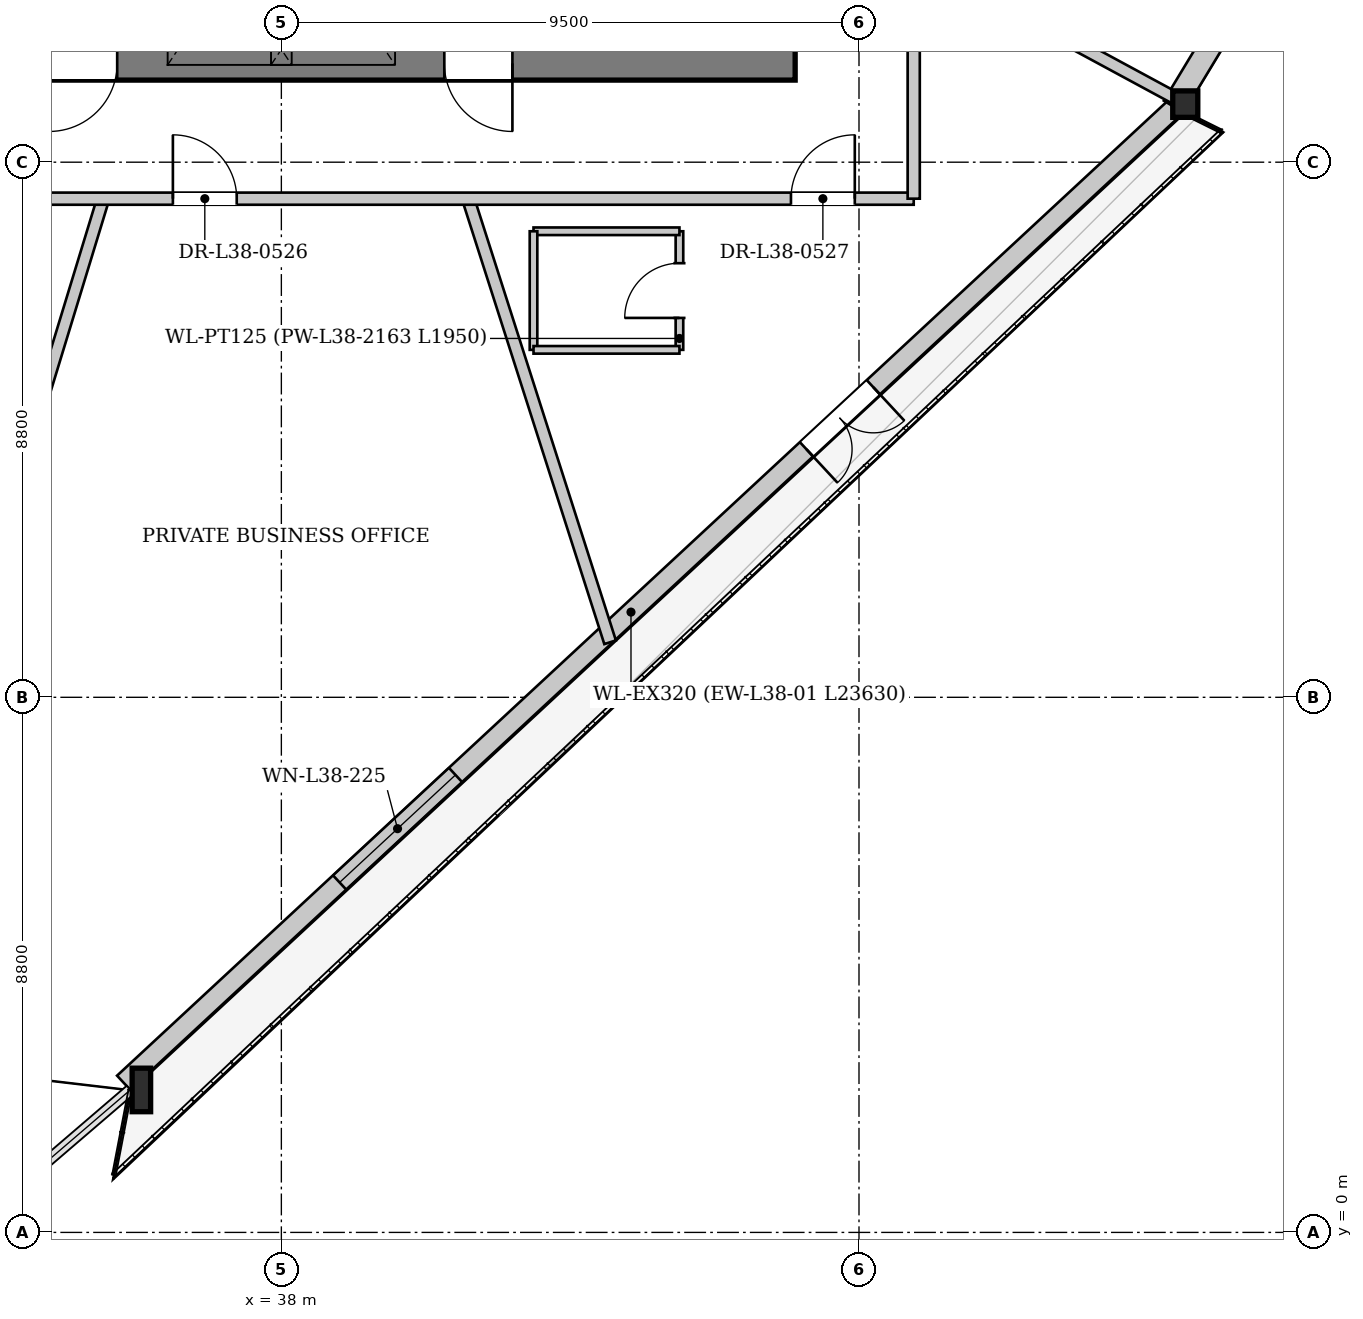
"""IFC4 building model, lengths in metres.
Left out: names, types, materials, properties, quantities, classifications, styles, units other than length and angle.
Written with IfcOpenShell. Run it as: python <this file> out.ifc"""

import sys

from ifc_helpers import new_model, si_unit, direction, frame, frame_2d, origin, origin_2d, place, context, subcontext, project, spatial, rectangle, i_section, extrude, source, transform, mapped, element, fill, save


model = new_model("IFC4")
c1 = context("Model", 3, precision=1e-05, world=origin(), true_north=direction((0.0, 1.0)))
c2 = subcontext(c1, "Body", "Model", "MODEL_VIEW")
j1 = project(units=[si_unit("LENGTHUNIT", "METRE"), si_unit("PLANEANGLEUNIT", "RADIAN")], contexts=[c1])
p1 = place(None, origin())
s1 = spatial("IfcSite", under=j1, at=p1, CompositionType="ELEMENT")
p2 = place(p1, origin())
s2 = spatial("IfcBuilding", under=s1, at=p2, CompositionType="ELEMENT")
p3 = place(p2, frame((0.0, 0.0, 146.6)))
s3 = spatial("IfcBuildingStorey", under=s2, at=p3, CompositionType="ELEMENT", Elevation=146.6)
m1 = source(origin(), c2, "Body", "SweptSolid", [
    extrude(i_section(OverallWidth=0.304, OverallDepth=0.716, WebThickness=0.021, FlangeThickness=0.04, at=origin_2d()), origin(), (0.0, 0.0, 1.0), 3.405),
])
p4 = place(p3, frame((35.516, 2.344, 0.0), z_axis=(0.107062289558, -0.000286838016, 0.994252273761), x_axis=(0.002679159842, 0.999996411045, 0.0)))
e1 = element("IfcColumn", 1, at=p4, inside=s3, PredefinedType="COLUMN", context=c2, shape_type="MappedRepresentation", body=[
    mapped(m1, transform((0.0, 0.0, 0.0), x_axis=(1.0, 0.0, 0.0), y_axis=(0.0, 1.0, 0.0), z_axis=(0.0, 0.0, 1.0), scale=1.0)),
])
m2 = source(origin(), c2, "Body", "SweptSolid", [
    extrude(i_section(OverallWidth=0.412, OverallDepth=0.435, WebThickness=0.031, FlangeThickness=0.05, at=origin_2d()), origin(), (0.0, 0.0, 1.0), 3.397),
])
p5 = place(p3, frame((52.839, 18.415, 0.0), z_axis=(0.016098414869, 0.082648112052, 0.996448759652), x_axis=(-0.981553147676, 0.191189482678, 0.0)))
e2 = element("IfcColumn", 2, at=p5, inside=s3, PredefinedType="COLUMN", context=c2, shape_type="MappedRepresentation", body=[
    mapped(m2, transform((0.0, 0.0, 0.0), x_axis=(1.0, 0.0, 0.0), y_axis=(0.0, 1.0, 0.0), z_axis=(0.0, 0.0, 1.0), scale=1.0)),
])
p6 = place(p3, frame((52.73, 18.532, 0.0), z_axis=(0.0, 0.0, 1.0), x_axis=(-0.73309626957, -0.680124885255, 0.0)))
e3 = element("IfcWall", 3, at=p6, inside=s3, PredefinedType="SOLIDWALL", context=c2, shape_type="SweptSolid", body=[
    extrude(rectangle(XDim=23.63, YDim=0.32, at=frame_2d((11.815, 0.0))), origin(), (0.0, 0.0, 1.0), 2.692),
])
p7 = place(p6, frame((6.812, 0.0, 0.0)))
e4 = element("IfcOpeningElement", 4, at=p7, cuts=e3, PredefinedType="OPENING", context=c2, shape_type="SweptSolid", body=[
    extrude(rectangle(XDim=1.5, YDim=2.3, at=frame_2d((0.75, 1.15))), frame((0.0, 0.17, 0.0), z_axis=(0.0, -1.0, 0.0), x_axis=(1.0, 0.0, 0.0)), (0.0, 0.0, 1.0), 0.34),
])
p8 = place(p6, frame((16.186, 0.0, 0.25)))
e5 = element("IfcOpeningElement", 5, at=p8, cuts=e3, PredefinedType="OPENING", context=c2, shape_type="SweptSolid", body=[
    extrude(rectangle(XDim=2.6, YDim=2.35, at=frame_2d((1.3, 1.175))), frame((0.0, 0.17, 0.0), z_axis=(0.0, -1.0, 0.0), x_axis=(1.0, 0.0, 0.0)), (0.0, 0.0, 1.0), 0.34),
])
p9 = place(p3, frame((64.901, 38.735, 0.0), z_axis=(0.0, 0.0, 1.0), x_axis=(-0.517346318523, -0.855776131188, 0.0)))
e6 = element("IfcWall", 6, at=p9, inside=s3, PredefinedType="SOLIDWALL", context=c2, shape_type="SweptSolid", body=[
    extrude(rectangle(XDim=23.63, YDim=0.38, at=frame_2d((11.815, 0.0))), origin(), (0.0, 0.0, 1.0), 2.692),
])
p10 = place(p9, frame((4.416, 0.0, 0.322)))
e7 = element("IfcOpeningElement", 7, at=p10, cuts=e6, PredefinedType="OPENING", context=c2, shape_type="SweptSolid", body=[
    extrude(rectangle(XDim=2.2, YDim=2.25, at=frame_2d((1.1, 1.125))), frame((0.0, 0.2, 0.0), z_axis=(0.0, -1.0, 0.0), x_axis=(1.0, 0.0, 0.0)), (0.0, 0.0, 1.0), 0.4),
])
p11 = place(p9, frame((15.914, 0.0, 0.322)))
e8 = element("IfcOpeningElement", 8, at=p11, cuts=e6, PredefinedType="OPENING", context=c2, shape_type="SweptSolid", body=[
    extrude(rectangle(XDim=2.2, YDim=2.25, at=frame_2d((1.1, 1.125))), frame((0.0, 0.2, 0.0), z_axis=(0.0, -1.0, 0.0), x_axis=(1.0, 0.0, 0.0)), (0.0, 0.0, 1.0), 0.4),
])
p12 = place(p3, frame((46.45, 19.225, 0.0), z_axis=(0.0, 0.0, 1.0), x_axis=(-1.0, 0.0, 0.0)))
e9 = element("IfcWall", 9, at=p12, inside=s3, PredefinedType="SHEAR", context=c2, shape_type="SweptSolid", body=[
    extrude(rectangle(XDim=16.9, YDim=0.55, at=frame_2d((8.45, 0.0))), origin(), (0.0, 0.0, 1.0), 3.3),
])
p13 = place(p12, frame((4.65, 0.0, 0.0)))
e10 = element("IfcOpeningElement", 10, at=p13, cuts=e9, PredefinedType="OPENING", context=c2, shape_type="SweptSolid", body=[
    extrude(rectangle(XDim=1.12, YDim=2.25, at=frame_2d((0.56, 1.125))), frame((0.0, 0.285, 0.0), z_axis=(0.0, -1.0, 0.0), x_axis=(1.0, 0.0, 0.0)), (0.0, 0.0, 1.0), 0.57),
])
p14 = place(p12, frame((11.15, 0.0, 0.0)))
e11 = element("IfcOpeningElement", 11, at=p14, cuts=e9, PredefinedType="OPENING", context=c2, shape_type="SweptSolid", body=[
    extrude(rectangle(XDim=1.12, YDim=2.25, at=frame_2d((0.56, 1.125))), frame((0.0, 0.285, 0.0), z_axis=(0.0, -1.0, 0.0), x_axis=(1.0, 0.0, 0.0)), (0.0, 0.0, 1.0), 0.57),
])
p15 = place(p3, frame((35.07, 17.0, 0.0), z_axis=(0.0, 0.0, 1.0), x_axis=(-0.29195683842, -0.956431494933, 0.0)))
e12 = element("IfcWall", 12, at=p15, inside=s3, PredefinedType="PARTITIONING", context=c2, shape_type="SweptSolid", body=[
    extrude(rectangle(XDim=14.719, YDim=0.2, at=frame_2d((7.36, 0.0))), origin(), (0.0, 0.0, 1.0), 2.895),
])
p16 = place(p3, frame((41.072, 17.0, 0.0), z_axis=(0.0, 0.0, 1.0), x_axis=(0.304787292701, -0.952420446131, 0.0)))
e13 = element("IfcWall", 13, at=p16, inside=s3, PredefinedType="PARTITIONING", context=c2, shape_type="SweptSolid", body=[
    extrude(rectangle(XDim=7.659, YDim=0.2, at=frame_2d((3.83, 0.0))), origin(), (0.0, 0.0, 1.0), 3.3),
])
p17 = place(p3, frame((48.4, 20.978, 0.0), z_axis=(0.0, 0.0, 1.0), x_axis=(0.879687571987, -0.475552074638, 0.0)))
e14 = element("IfcWall", 14, at=p17, inside=s3, PredefinedType="PARTITIONING", context=c2, shape_type="SweptSolid", body=[
    extrude(rectangle(XDim=5.101, YDim=0.2, at=frame_2d((2.55, 0.0))), origin(), (0.0, 0.0, 1.0), 2.835),
])
p18 = place(p3, frame((44.547, 14.514, 0.0), z_axis=(0.0, 0.0, 1.0), x_axis=(0.0, 1.0, 0.0)))
e15 = element("IfcWall", 15, at=p18, inside=s3, PredefinedType="PARTITIONING", context=c2, shape_type="SweptSolid", body=[
    extrude(rectangle(XDim=1.95, YDim=0.125, at=frame_2d((0.975, 0.0))), origin(), (0.0, 0.0, 1.0), 3.3),
])
p19 = place(p18, frame((0.525, 0.0, 0.0)))
e16 = element("IfcOpeningElement", 16, at=p19, cuts=e15, PredefinedType="OPENING", context=c2, shape_type="SweptSolid", body=[
    extrude(rectangle(XDim=0.9, YDim=2.1, at=frame_2d((0.45, 1.05))), frame((0.0, 0.073, 0.0), z_axis=(0.0, -1.0, 0.0), x_axis=(1.0, 0.0, 0.0)), (0.0, 0.0, 1.0), 0.145),
])
p20 = place(p3, frame((44.547, 16.464, 0.0), z_axis=(0.0, 0.0, 1.0), x_axis=(-1.0, 0.0, 0.0)))
e17 = element("IfcWall", 17, at=p20, inside=s3, PredefinedType="PARTITIONING", context=c2, shape_type="SweptSolid", body=[
    extrude(rectangle(XDim=2.4, YDim=0.125, at=frame_2d((1.2, 0.0))), origin(), (0.0, 0.0, 1.0), 3.3),
])
p21 = place(p3, frame((42.147, 16.464, 0.0), z_axis=(0.0, 0.0, 1.0), x_axis=(0.0, -1.0, 0.0)))
e18 = element("IfcWall", 18, at=p21, inside=s3, PredefinedType="PARTITIONING", context=c2, shape_type="SweptSolid", body=[
    extrude(rectangle(XDim=1.95, YDim=0.125, at=frame_2d((0.975, 0.0))), origin(), (0.0, 0.0, 1.0), 3.3),
])
p22 = place(p3, frame((42.147, 14.514, 0.0), z_axis=(0.0, 0.0, 1.0), x_axis=(1.0, 0.0, 0.0)))
e19 = element("IfcWall", 19, at=p22, inside=s3, PredefinedType="PARTITIONING", context=c2, shape_type="SweptSolid", body=[
    extrude(rectangle(XDim=2.4, YDim=0.125, at=frame_2d((1.2, 0.0))), origin(), (0.0, 0.0, 1.0), 3.3),
])
p23 = place(p3, frame((27.6, 17.0, 0.0), z_axis=(0.0, 0.0, 1.0), x_axis=(1.0, 0.0, 0.0)))
e20 = element("IfcWall", 20, at=p23, inside=s3, PredefinedType="PARTITIONING", context=c2, shape_type="SweptSolid", body=[
    extrude(rectangle(XDim=20.8, YDim=0.2, at=frame_2d((10.4, 0.0))), origin(), (0.0, 0.0, 1.0), 3.3),
])
p24 = place(p23, frame((1.56, 0.0, 0.0)))
e21 = element("IfcOpeningElement", 21, at=p24, cuts=e20, PredefinedType="OPENING", context=c2, shape_type="SweptSolid", body=[
    extrude(rectangle(XDim=1.05, YDim=2.2, at=frame_2d((0.525, 1.1))), frame((0.0, 0.11, 0.0), z_axis=(0.0, -1.0, 0.0), x_axis=(1.0, 0.0, 0.0)), (0.0, 0.0, 1.0), 0.22),
])
p25 = place(p23, frame((8.616, 0.0, 0.0)))
e22 = element("IfcOpeningElement", 22, at=p25, cuts=e20, PredefinedType="OPENING", context=c2, shape_type="SweptSolid", body=[
    extrude(rectangle(XDim=1.05, YDim=2.2, at=frame_2d((0.525, 1.1))), frame((0.0, 0.11, 0.0), z_axis=(0.0, -1.0, 0.0), x_axis=(1.0, 0.0, 0.0)), (0.0, 0.0, 1.0), 0.22),
])
p26 = place(p23, frame((18.781, 0.0, 0.0)))
e23 = element("IfcOpeningElement", 23, at=p26, cuts=e20, PredefinedType="OPENING", context=c2, shape_type="SweptSolid", body=[
    extrude(rectangle(XDim=1.05, YDim=2.2, at=frame_2d((0.525, 1.1))), frame((0.0, 0.11, 0.0), z_axis=(0.0, -1.0, 0.0), x_axis=(1.0, 0.0, 0.0)), (0.0, 0.0, 1.0), 0.22),
])
p27 = place(p3, frame((48.4, 17.0, 0.0), z_axis=(0.0, 0.0, 1.0), x_axis=(0.0, 1.0, 0.0)))
e24 = element("IfcWall", 24, at=p27, inside=s3, PredefinedType="PARTITIONING", context=c2, shape_type="SweptSolid", body=[
    extrude(rectangle(XDim=19.2, YDim=0.2, at=frame_2d((9.6, 0.0))), origin(), (0.0, 0.0, 1.0), 3.3),
])
p28 = place(p27, frame((6.726, 0.0, 0.0)))
e25 = element("IfcOpeningElement", 25, at=p28, cuts=e24, PredefinedType="OPENING", context=c2, shape_type="SweptSolid", body=[
    extrude(rectangle(XDim=1.05, YDim=2.2, at=frame_2d((0.525, 1.1))), frame((0.0, 0.11, 0.0), z_axis=(0.0, -1.0, 0.0), x_axis=(1.0, 0.0, 0.0)), (0.0, 0.0, 1.0), 0.22),
])
p29 = place(p27, frame((17.4, 0.0, 0.0)))
e26 = element("IfcOpeningElement", 26, at=p29, cuts=e24, PredefinedType="OPENING", context=c2, shape_type="SweptSolid", body=[
    extrude(rectangle(XDim=1.05, YDim=2.2, at=frame_2d((0.525, 1.1))), frame((0.0, 0.11, 0.0), z_axis=(0.0, -1.0, 0.0), x_axis=(1.0, 0.0, 0.0)), (0.0, 0.0, 1.0), 0.22),
])
m3 = source(origin(), c2, "Body", "SweptSolid", [
    extrude(rectangle(XDim=1.5, YDim=2.3, at=frame_2d((0.75, 1.15))), frame((0.0, 0.025, 0.0), z_axis=(0.0, -1.0, 0.0), x_axis=(1.0, 0.0, 0.0)), (0.0, 0.0, 1.0), 0.05),
])
p30 = place(p7, origin())
e27 = element("IfcDoor", 27, at=p30, inside=s3, OperationType="DOUBLE_DOOR_SINGLE_SWING", PredefinedType="DOOR", context=c2, shape_type="MappedRepresentation", body=[
    mapped(m3, transform((0.0, 0.0, 0.0), x_axis=(1.0, 0.0, 0.0), y_axis=(0.0, 1.0, 0.0), z_axis=(0.0, 0.0, 1.0), scale=1.0)),
])
fill(e4, e27)
m4 = source(origin(), c2, "Body", "SweptSolid", [
    extrude(rectangle(XDim=2.6, YDim=2.35, at=frame_2d((1.3, 1.175))), frame((0.0, 0.03, 0.0), z_axis=(0.0, -1.0, 0.0), x_axis=(1.0, 0.0, 0.0)), (0.0, 0.0, 1.0), 0.06),
])
p31 = place(p8, origin())
e28 = element("IfcWindow", 28, at=p31, inside=s3, PartitioningType="SINGLE_PANEL", PredefinedType="WINDOW", context=c2, shape_type="MappedRepresentation", body=[
    mapped(m4, transform((0.0, 0.0, 0.0), x_axis=(1.0, 0.0, 0.0), y_axis=(0.0, 1.0, 0.0), z_axis=(0.0, 0.0, 1.0), scale=1.0)),
])
fill(e5, e28)
m5 = source(origin(), c2, "Body", "SweptSolid", [
    extrude(rectangle(XDim=1.12, YDim=2.25, at=frame_2d((0.56, 1.125))), frame((0.0, 0.025, 0.0), z_axis=(0.0, -1.0, 0.0), x_axis=(1.0, 0.0, 0.0)), (0.0, 0.0, 1.0), 0.05),
])
p32 = place(p13, origin())
e29 = element("IfcDoor", 29, at=p32, inside=s3, OperationType="SINGLE_SWING_LEFT", PredefinedType="DOOR", context=c2, shape_type="MappedRepresentation", body=[
    mapped(m5, transform((0.0, 0.0, 0.0), x_axis=(1.0, 0.0, 0.0), y_axis=(0.0, 1.0, 0.0), z_axis=(0.0, 0.0, 1.0), scale=1.0)),
])
fill(e10, e29)
p33 = place(p14, origin())
e30 = element("IfcDoor", 30, at=p33, inside=s3, OperationType="SINGLE_SWING_RIGHT", PredefinedType="DOOR", context=c2, shape_type="MappedRepresentation", body=[
    mapped(m5, transform((0.0, 0.0, 0.0), x_axis=(1.0, 0.0, 0.0), y_axis=(0.0, 1.0, 0.0), z_axis=(0.0, 0.0, 1.0), scale=1.0)),
])
fill(e11, e30)
m6 = source(origin(), c2, "Body", "SweptSolid", [
    extrude(rectangle(XDim=0.9, YDim=2.1, at=frame_2d((0.45, 1.05))), frame((0.0, 0.025, 0.0), z_axis=(0.0, -1.0, 0.0), x_axis=(1.0, 0.0, 0.0)), (0.0, 0.0, 1.0), 0.05),
])
p34 = place(p19, origin())
e31 = element("IfcDoor", 31, at=p34, inside=s3, OperationType="SINGLE_SWING_LEFT", PredefinedType="DOOR", context=c2, shape_type="MappedRepresentation", body=[
    mapped(m6, transform((0.0, 0.0, 0.0), x_axis=(1.0, 0.0, 0.0), y_axis=(0.0, 1.0, 0.0), z_axis=(0.0, 0.0, 1.0), scale=1.0)),
])
fill(e16, e31)
m7 = source(origin(), c2, "Body", "SweptSolid", [
    extrude(rectangle(XDim=1.05, YDim=2.2, at=frame_2d((0.525, 1.1))), frame((0.0, 0.025, 0.0), z_axis=(0.0, -1.0, 0.0), x_axis=(1.0, 0.0, 0.0)), (0.0, 0.0, 1.0), 0.05),
])
p35 = place(p25, origin())
e32 = element("IfcDoor", 32, at=p35, inside=s3, OperationType="SINGLE_SWING_LEFT", PredefinedType="DOOR", context=c2, shape_type="MappedRepresentation", body=[
    mapped(m7, transform((0.0, 0.0, 0.0), x_axis=(1.0, 0.0, 0.0), y_axis=(0.0, 1.0, 0.0), z_axis=(0.0, 0.0, 1.0), scale=1.0)),
])
fill(e22, e32)
p36 = place(p26, origin())
e33 = element("IfcDoor", 33, at=p36, inside=s3, OperationType="SINGLE_SWING_RIGHT", PredefinedType="DOOR", context=c2, shape_type="MappedRepresentation", body=[
    mapped(m7, transform((0.0, 0.0, 0.0), x_axis=(1.0, 0.0, 0.0), y_axis=(0.0, 1.0, 0.0), z_axis=(0.0, 0.0, 1.0), scale=1.0)),
])
fill(e23, e33)
save(model, sys.argv[1])
